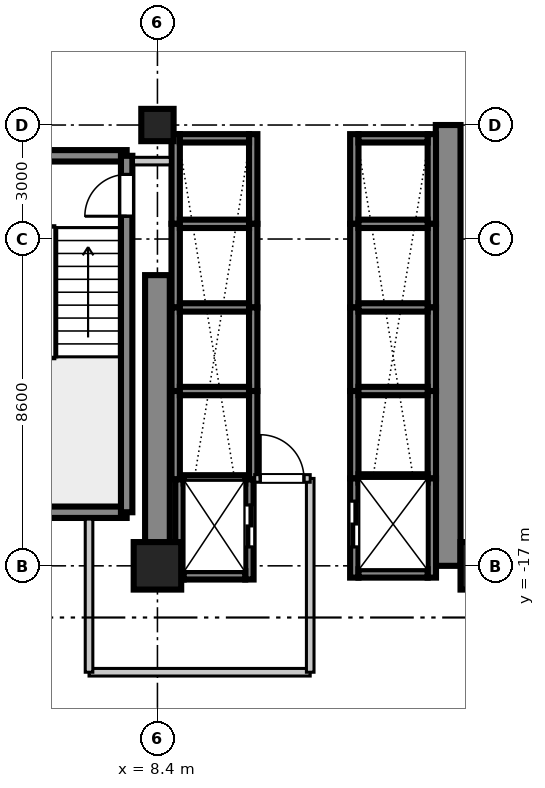
"""IFC4 building model, lengths in metres.
Left out: names, types, materials, properties, quantities, classifications, styles, units other than length and angle.
Written with IfcOpenShell. Run it as: python <this file> out.ifc"""

import sys

from ifc_helpers import new_model, si_unit, direction, frame, frame_2d, origin, origin_2d, place, context, subcontext, project, spatial, rectangle, extrude, source, transform, mapped, element, fill, save


model = new_model("IFC4")
c1 = context("Model", 3, precision=1e-05, world=origin(), true_north=direction((0.0, 1.0)))
c2 = subcontext(c1, "Body", "Model", "MODEL_VIEW")
j1 = project(units=[si_unit("LENGTHUNIT", "METRE"), si_unit("PLANEANGLEUNIT", "RADIAN")], contexts=[c1])
p1 = place(None, origin())
s1 = spatial("IfcSite", under=j1, at=p1, CompositionType="ELEMENT")
p2 = place(p1, origin())
s2 = spatial("IfcBuilding", under=s1, at=p2, CompositionType="ELEMENT")
p3 = place(p2, frame((0.0, 0.0, 91.95)))
s3 = spatial("IfcBuildingStorey", under=s2, at=p3, CompositionType="ELEMENT", Elevation=91.95)
m1 = source(origin(), c2, "Body", "SweptSolid", [
    extrude(rectangle(XDim=1.25, YDim=1.25, at=origin_2d()), origin(), (0.0, 0.0, 1.0), 3.605),
])
p4 = place(p3, frame((8.4, -17.0, 0.0), z_axis=(0.0, 0.0, 1.0), x_axis=(1.0, 0.0, 0.0)))
e1 = element("IfcColumn", 1, at=p4, inside=s3, PredefinedType="COLUMN", context=c2, shape_type="MappedRepresentation", body=[
    mapped(m1, transform((0.0, 0.0, 0.0), scale=1.0)),
])
m2 = source(origin(), c2, "Body", "SweptSolid", [
    extrude(rectangle(XDim=0.85, YDim=0.85, at=origin_2d()), origin(), (0.0, 0.0, 1.0), 3.605),
])
p5 = place(p3, frame((8.4, -5.4, 0.0), z_axis=(0.0, 0.0, 1.0), x_axis=(1.0, 0.0, 0.0)))
e2 = element("IfcColumn", 2, at=p5, inside=s3, PredefinedType="PILASTER", context=c2, shape_type="MappedRepresentation", body=[
    mapped(m2, transform((0.0, 0.0, 0.0), scale=1.0)),
])
p6 = place(p3, frame((17.0, -17.0, 0.0), z_axis=(0.0, 0.0, 1.0), x_axis=(1.0, 0.0, 0.0)))
e3 = element("IfcColumn", 3, at=p6, inside=s3, PredefinedType="COLUMN", context=c2, shape_type="MappedRepresentation", body=[
    mapped(m1, transform((0.0, 0.0, 0.0), scale=1.0)),
])
m3 = source(origin(), c2, "Body", "SweptSolid", [
    extrude(rectangle(XDim=7.65, YDim=0.65, at=frame_2d((3.825, 0.0))), origin(), (0.0, 0.0, 1.0), 3.38),
])
p7 = place(p3, frame((8.4, -17.0, 0.0), z_axis=(0.0, 0.0, 1.0), x_axis=(0.0, 1.0, 0.0)))
e4 = element("IfcWall", 4, at=p7, inside=s3, PredefinedType="SHEAR", context=c2, shape_type="MappedRepresentation", body=[
    mapped(m3, transform((0.0, 0.0, 0.0), scale=1.0)),
])
m4 = source(origin(), c2, "Body", "SweptSolid", [
    extrude(rectangle(XDim=11.6, YDim=0.65, at=frame_2d((5.8, 0.0))), origin(), (0.0, 0.0, 1.0), 3.38),
])
p8 = place(p3, frame((16.05, -17.0, 0.0), z_axis=(0.0, 0.0, 1.0), x_axis=(0.0, 1.0, 0.0)))
e5 = element("IfcWall", 5, at=p8, inside=s3, PredefinedType="SHEAR", context=c2, shape_type="MappedRepresentation", body=[
    mapped(m4, transform((0.0, 0.0, 0.0), scale=1.0)),
])
m5 = source(origin(), c2, "Body", "SweptSolid", [
    extrude(rectangle(XDim=3.98, YDim=0.3, at=frame_2d((1.99, 0.0))), origin(), (0.0, 0.0, 1.0), 3.38),
])
for number, where, z_axis, x_axis in (
    (6, (3.61, -15.59, 0.0), (0.0, 0.0, 1.0), (1.0, 0.0, 0.0)),
    (7, (3.61, -6.21, 0.0), (0.0, 0.0, 1.0), (1.0, 0.0, 0.0)),
):
    element("IfcWall", number, at=place(p3, frame(where, z_axis=z_axis, x_axis=x_axis)), inside=s3, PredefinedType="SHEAR", context=c2, shape_type="MappedRepresentation", body=[
        mapped(m5, transform((0.0, 0.0, 0.0), scale=1.0)),
    ])
m6 = source(origin(), c2, "Body", "SweptSolid", [
    extrude(rectangle(XDim=9.38, YDim=0.3, at=frame_2d((4.69, 0.0))), origin(), (0.0, 0.0, 1.0), 3.38),
])
p9 = place(p3, frame((7.59, -15.59, 0.0), z_axis=(0.0, 0.0, 1.0), x_axis=(0.0, 1.0, 0.0)))
e8 = element("IfcWall", 8, at=p9, inside=s3, PredefinedType="SHEAR", context=c2, shape_type="MappedRepresentation", body=[
    mapped(m6, transform((0.0, 0.0, 0.0), scale=1.0)),
])
p10 = place(p9, frame((7.79, 0.0, 0.0)))
e9 = element("IfcOpeningElement", 9, at=p10, cuts=e8, PredefinedType="OPENING", context=c2, shape_type="SweptSolid", body=[
    extrude(rectangle(XDim=1.1, YDim=2.15, at=frame_2d((0.55, 1.075))), frame((0.0, 0.16, 0.0), z_axis=(0.0, -1.0, 0.0), x_axis=(1.0, 0.0, 0.0)), (0.0, 0.0, 1.0), 0.32),
])
m7 = source(origin(), c2, "Body", "SweptSolid", [
    extrude(rectangle(XDim=2.36, YDim=0.22, at=frame_2d((1.18, 0.0))), origin(), (0.0, 0.0, 1.0), 3.38),
])
for number, where, z_axis, x_axis in (
    (10, (13.58, -8.0, 0.0), (0.0, 0.0, 1.0), (0.0, 1.0, 0.0)),
    (11, (15.62, -8.0, 0.0), (0.0, 0.0, 1.0), (0.0, 1.0, 0.0)),
):
    element("IfcWall", number, at=place(p3, frame(where, z_axis=z_axis, x_axis=x_axis)), inside=s3, PredefinedType="SHEAR", context=c2, shape_type="MappedRepresentation", body=[
        mapped(m7, transform((0.0, 0.0, 0.0), scale=1.0)),
    ])
m8 = source(origin(), c2, "Body", "SweptSolid", [
    extrude(rectangle(XDim=1.82, YDim=0.22, at=frame_2d((0.91, 0.0))), origin(), (0.0, 0.0, 1.0), 3.38),
])
p11 = place(p3, frame((13.69, -5.75, 0.0), z_axis=(0.0, 0.0, 1.0), x_axis=(1.0, 0.0, 0.0)))
e12 = element("IfcWall", 12, at=p11, inside=s3, PredefinedType="SHEAR", context=c2, shape_type="MappedRepresentation", body=[
    mapped(m8, transform((0.0, 0.0, 0.0), scale=1.0)),
])
m9 = source(origin(), c2, "Body", "SweptSolid", [
    extrude(rectangle(XDim=2.2, YDim=0.22, at=frame_2d((1.1, 0.0))), origin(), (0.0, 0.0, 1.0), 3.38),
])
for number, where, z_axis, x_axis in (
    (13, (13.58, -10.2, 0.0), (0.0, 0.0, 1.0), (0.0, 1.0, 0.0)),
    (14, (15.62, -10.2, 0.0), (0.0, 0.0, 1.0), (0.0, 1.0, 0.0)),
):
    element("IfcWall", number, at=place(p3, frame(where, z_axis=z_axis, x_axis=x_axis)), inside=s3, PredefinedType="SHEAR", context=c2, shape_type="MappedRepresentation", body=[
        mapped(m9, transform((0.0, 0.0, 0.0), scale=1.0)),
    ])
m10 = source(origin(), c2, "Body", "SweptSolid", [
    extrude(rectangle(XDim=1.82, YDim=0.22, at=frame_2d((0.91, 0.0))), origin(), (0.0, 0.0, 1.0), 3.65),
])
p12 = place(p3, frame((13.69, -8.0, 0.0), z_axis=(0.0, 0.0, 1.0), x_axis=(1.0, 0.0, 0.0)))
e15 = element("IfcWall", 15, at=p12, inside=s3, PredefinedType="SHEAR", context=c2, shape_type="MappedRepresentation", body=[
    mapped(m10, transform((0.0, 0.0, 0.0), scale=1.0)),
])
for number, where, z_axis, x_axis in (
    (16, (13.58, -12.4, 0.0), (0.0, 0.0, 1.0), (0.0, 1.0, 0.0)),
    (17, (15.62, -12.4, 0.0), (0.0, 0.0, 1.0), (0.0, 1.0, 0.0)),
):
    element("IfcWall", number, at=place(p3, frame(where, z_axis=z_axis, x_axis=x_axis)), inside=s3, PredefinedType="SHEAR", context=c2, shape_type="MappedRepresentation", body=[
        mapped(m9, transform((0.0, 0.0, 0.0), scale=1.0)),
    ])
p13 = place(p3, frame((13.69, -10.2, 0.0), z_axis=(0.0, 0.0, 1.0), x_axis=(1.0, 0.0, 0.0)))
e18 = element("IfcWall", 18, at=p13, inside=s3, PredefinedType="SHEAR", context=c2, shape_type="MappedRepresentation", body=[
    mapped(m10, transform((0.0, 0.0, 0.0), scale=1.0)),
])
m11 = source(origin(), c2, "Body", "SweptSolid", [
    extrude(rectangle(XDim=2.3, YDim=0.22, at=frame_2d((1.15, 0.0))), origin(), (0.0, 0.0, 1.0), 3.38),
])
for number, where, z_axis, x_axis in (
    (19, (13.58, -14.7, 0.0), (0.0, 0.0, 1.0), (0.0, 1.0, 0.0)),
    (20, (15.62, -14.7, 0.0), (0.0, 0.0, 1.0), (0.0, 1.0, 0.0)),
):
    element("IfcWall", number, at=place(p3, frame(where, z_axis=z_axis, x_axis=x_axis)), inside=s3, PredefinedType="SHEAR", context=c2, shape_type="MappedRepresentation", body=[
        mapped(m11, transform((0.0, 0.0, 0.0), scale=1.0)),
    ])
p14 = place(p3, frame((13.69, -12.4, 0.0), z_axis=(0.0, 0.0, 1.0), x_axis=(1.0, 0.0, 0.0)))
e21 = element("IfcWall", 21, at=p14, inside=s3, PredefinedType="SHEAR", context=c2, shape_type="MappedRepresentation", body=[
    mapped(m10, transform((0.0, 0.0, 0.0), scale=1.0)),
])
for number, where, z_axis, x_axis in (
    (22, (8.88, -8.0, 0.0), (0.0, 0.0, 1.0), (0.0, 1.0, 0.0)),
    (23, (10.92, -8.0, 0.0), (0.0, 0.0, 1.0), (0.0, 1.0, 0.0)),
):
    element("IfcWall", number, at=place(p3, frame(where, z_axis=z_axis, x_axis=x_axis)), inside=s3, PredefinedType="SHEAR", context=c2, shape_type="MappedRepresentation", body=[
        mapped(m7, transform((0.0, 0.0, 0.0), scale=1.0)),
    ])
p15 = place(p3, frame((8.99, -5.75, 0.0), z_axis=(0.0, 0.0, 1.0), x_axis=(1.0, 0.0, 0.0)))
e24 = element("IfcWall", 24, at=p15, inside=s3, PredefinedType="SHEAR", context=c2, shape_type="MappedRepresentation", body=[
    mapped(m8, transform((0.0, 0.0, 0.0), scale=1.0)),
])
for number, where, z_axis, x_axis in (
    (25, (8.88, -10.2, 0.0), (0.0, 0.0, 1.0), (0.0, 1.0, 0.0)),
    (26, (10.92, -10.2, 0.0), (0.0, 0.0, 1.0), (0.0, 1.0, 0.0)),
):
    element("IfcWall", number, at=place(p3, frame(where, z_axis=z_axis, x_axis=x_axis)), inside=s3, PredefinedType="SHEAR", context=c2, shape_type="MappedRepresentation", body=[
        mapped(m9, transform((0.0, 0.0, 0.0), scale=1.0)),
    ])
p16 = place(p3, frame((8.99, -8.0, 0.0), z_axis=(0.0, 0.0, 1.0), x_axis=(1.0, 0.0, 0.0)))
e27 = element("IfcWall", 27, at=p16, inside=s3, PredefinedType="SHEAR", context=c2, shape_type="MappedRepresentation", body=[
    mapped(m10, transform((0.0, 0.0, 0.0), scale=1.0)),
])
for number, where, z_axis, x_axis in (
    (28, (8.88, -12.4, 0.0), (0.0, 0.0, 1.0), (0.0, 1.0, 0.0)),
    (29, (10.92, -12.4, 0.0), (0.0, 0.0, 1.0), (0.0, 1.0, 0.0)),
):
    element("IfcWall", number, at=place(p3, frame(where, z_axis=z_axis, x_axis=x_axis)), inside=s3, PredefinedType="SHEAR", context=c2, shape_type="MappedRepresentation", body=[
        mapped(m9, transform((0.0, 0.0, 0.0), scale=1.0)),
    ])
p17 = place(p3, frame((8.99, -10.2, 0.0), z_axis=(0.0, 0.0, 1.0), x_axis=(1.0, 0.0, 0.0)))
e30 = element("IfcWall", 30, at=p17, inside=s3, PredefinedType="SHEAR", context=c2, shape_type="MappedRepresentation", body=[
    mapped(m10, transform((0.0, 0.0, 0.0), scale=1.0)),
])
m12 = source(origin(), c2, "Body", "SweptSolid", [
    extrude(rectangle(XDim=2.325, YDim=0.22, at=frame_2d((1.163, 0.0))), origin(), (0.0, 0.0, 1.0), 3.38),
])
for number, where, z_axis, x_axis in (
    (31, (8.88, -14.725, 0.0), (0.0, 0.0, 1.0), (0.0, 1.0, 0.0)),
    (32, (10.92, -14.725, 0.0), (0.0, 0.0, 1.0), (0.0, 1.0, 0.0)),
):
    element("IfcWall", number, at=place(p3, frame(where, z_axis=z_axis, x_axis=x_axis)), inside=s3, PredefinedType="SHEAR", context=c2, shape_type="MappedRepresentation", body=[
        mapped(m12, transform((0.0, 0.0, 0.0), scale=1.0)),
    ])
p18 = place(p3, frame((8.99, -12.4, 0.0), z_axis=(0.0, 0.0, 1.0), x_axis=(1.0, 0.0, 0.0)))
e33 = element("IfcWall", 33, at=p18, inside=s3, PredefinedType="SHEAR", context=c2, shape_type="MappedRepresentation", body=[
    mapped(m10, transform((0.0, 0.0, 0.0), scale=1.0)),
])
m13 = source(origin(), c2, "Body", "SweptSolid", [
    extrude(rectangle(XDim=2.635, YDim=0.22, at=frame_2d((1.317, 0.0))), origin(), (0.0, 0.0, 1.0), 3.38),
])
p19 = place(p3, frame((8.98, -17.36, 0.0), z_axis=(0.0, 0.0, 1.0), x_axis=(0.0, 1.0, 0.0)))
e34 = element("IfcWall", 34, at=p19, inside=s3, PredefinedType="SHEAR", context=c2, shape_type="MappedRepresentation", body=[
    mapped(m13, transform((0.0, 0.0, 0.0), scale=1.0)),
])
p20 = place(p3, frame((10.82, -17.36, 0.0), z_axis=(0.0, 0.0, 1.0), x_axis=(0.0, 1.0, 0.0)))
e35 = element("IfcWall", 35, at=p20, inside=s3, PredefinedType="SHEAR", context=c2, shape_type="MappedRepresentation", body=[
    mapped(m13, transform((0.0, 0.0, 0.0), scale=1.0)),
])
p21 = place(p20, frame((0.86, 0.0, 0.0)))
e36 = element("IfcOpeningElement", 36, at=p21, cuts=e35, PredefinedType="OPENING", context=c2, shape_type="SweptSolid", body=[
    extrude(rectangle(XDim=1.1, YDim=2.2, at=frame_2d((0.55, 1.1))), frame((0.0, 0.12, 0.0), z_axis=(0.0, -1.0, 0.0), x_axis=(1.0, 0.0, 0.0)), (0.0, 0.0, 1.0), 0.24),
])
m14 = source(origin(), c2, "Body", "SweptSolid", [
    extrude(rectangle(XDim=1.62, YDim=0.22, at=frame_2d((0.81, 0.0))), origin(), (0.0, 0.0, 1.0), 3.38),
])
p22 = place(p3, frame((9.09, -17.25, 0.0), z_axis=(0.0, 0.0, 1.0), x_axis=(1.0, 0.0, 0.0)))
e37 = element("IfcWall", 37, at=p22, inside=s3, PredefinedType="SHEAR", context=c2, shape_type="MappedRepresentation", body=[
    mapped(m14, transform((0.0, 0.0, 0.0), scale=1.0)),
])
m15 = source(origin(), c2, "Body", "SweptSolid", [
    extrude(rectangle(XDim=1.62, YDim=0.22, at=frame_2d((0.81, 0.0))), origin(), (0.0, 0.0, 1.0), 3.65),
])
p23 = place(p3, frame((9.09, -14.725, 0.0), z_axis=(0.0, 0.0, 1.0), x_axis=(1.0, 0.0, 0.0)))
e38 = element("IfcWall", 38, at=p23, inside=s3, PredefinedType="SHEAR", context=c2, shape_type="MappedRepresentation", body=[
    mapped(m15, transform((0.0, 0.0, 0.0), scale=1.0)),
])
m16 = source(origin(), c2, "Body", "SweptSolid", [
    extrude(rectangle(XDim=2.61, YDim=0.22, at=frame_2d((1.305, 0.0))), origin(), (0.0, 0.0, 1.0), 3.38),
])
p24 = place(p3, frame((13.58, -17.31, 0.0), z_axis=(0.0, 0.0, 1.0), x_axis=(0.0, 1.0, 0.0)))
e39 = element("IfcWall", 39, at=p24, inside=s3, PredefinedType="SHEAR", context=c2, shape_type="MappedRepresentation", body=[
    mapped(m16, transform((0.0, 0.0, 0.0), scale=1.0)),
])
p25 = place(p24, frame((0.81, 0.0, 0.0)))
e40 = element("IfcOpeningElement", 40, at=p25, cuts=e39, PredefinedType="OPENING", context=c2, shape_type="SweptSolid", body=[
    extrude(rectangle(XDim=1.2, YDim=2.2, at=frame_2d((0.6, 1.1))), frame((0.0, 0.12, 0.0), z_axis=(0.0, -1.0, 0.0), x_axis=(1.0, 0.0, 0.0)), (0.0, 0.0, 1.0), 0.24),
])
p26 = place(p3, frame((15.62, -17.31, 0.0), z_axis=(0.0, 0.0, 1.0), x_axis=(0.0, 1.0, 0.0)))
e41 = element("IfcWall", 41, at=p26, inside=s3, PredefinedType="SHEAR", context=c2, shape_type="MappedRepresentation", body=[
    mapped(m16, transform((0.0, 0.0, 0.0), scale=1.0)),
])
p27 = place(p3, frame((13.69, -17.2, 0.0), z_axis=(0.0, 0.0, 1.0), x_axis=(1.0, 0.0, 0.0)))
e42 = element("IfcWall", 42, at=p27, inside=s3, PredefinedType="SHEAR", context=c2, shape_type="MappedRepresentation", body=[
    mapped(m8, transform((0.0, 0.0, 0.0), scale=1.0)),
])
p28 = place(p3, frame((13.69, -14.7, 0.0), z_axis=(0.0, 0.0, 1.0), x_axis=(1.0, 0.0, 0.0)))
e43 = element("IfcWall", 43, at=p28, inside=s3, PredefinedType="SHEAR", context=c2, shape_type="MappedRepresentation", body=[
    mapped(m10, transform((0.0, 0.0, 0.0), scale=1.0)),
])
m17 = source(origin(), c2, "Body", "SweptSolid", [
    extrude(rectangle(XDim=5.82, YDim=0.2, at=frame_2d((2.91, 0.0))), origin(), (0.0, 0.0, 1.0), 2.72),
])
p29 = place(p3, frame((6.6, -19.8, 0.0), z_axis=(0.0, 0.0, 1.0), x_axis=(1.0, 0.0, 0.0)))
e44 = element("IfcWall", 44, at=p29, inside=s3, PredefinedType="PARTITIONING", context=c2, shape_type="MappedRepresentation", body=[
    mapped(m17, transform((0.0, 0.0, 0.0), scale=1.0)),
])
m18 = source(origin(), c2, "Body", "SweptSolid", [
    extrude(rectangle(XDim=4.03, YDim=0.2, at=frame_2d((2.015, 0.0))), origin(), (0.0, 0.0, 1.0), 2.72),
])
p30 = place(p3, frame((6.6, -19.8, 0.0), z_axis=(0.0, 0.0, 1.0), x_axis=(0.0, 1.0, 0.0)))
e45 = element("IfcWall", 45, at=p30, inside=s3, PredefinedType="PARTITIONING", context=c2, shape_type="MappedRepresentation", body=[
    mapped(m18, transform((0.0, 0.0, 0.0), scale=1.0)),
])
m19 = source(origin(), c2, "Body", "SweptSolid", [
    extrude(rectangle(XDim=5.1, YDim=0.2, at=frame_2d((2.55, 0.0))), origin(), (0.0, 0.0, 1.0), 2.72),
])
p31 = place(p3, frame((12.42, -19.8, 0.0), z_axis=(0.0, 0.0, 1.0), x_axis=(0.0, 1.0, 0.0)))
e46 = element("IfcWall", 46, at=p31, inside=s3, PredefinedType="PARTITIONING", context=c2, shape_type="MappedRepresentation", body=[
    mapped(m19, transform((0.0, 0.0, 0.0), scale=1.0)),
])
m20 = source(origin(), c2, "Body", "SweptSolid", [
    extrude(rectangle(XDim=1.46, YDim=0.2, at=frame_2d((0.73, 0.0))), origin(), (0.0, 0.0, 1.0), 2.72),
])
p32 = place(p3, frame((10.96, -14.7, 0.0), z_axis=(0.0, 0.0, 1.0), x_axis=(1.0, 0.0, 0.0)))
e47 = element("IfcWall", 47, at=p32, inside=s3, PredefinedType="PARTITIONING", context=c2, shape_type="MappedRepresentation", body=[
    mapped(m20, transform((0.0, 0.0, 0.0), scale=1.0)),
])
p33 = place(p32, frame((0.145, 0.0, 0.0)))
e48 = element("IfcOpeningElement", 48, at=p33, cuts=e47, PredefinedType="OPENING", context=c2, shape_type="SweptSolid", body=[
    extrude(rectangle(XDim=1.15, YDim=2.15, at=frame_2d((0.575, 1.075))), frame((0.0, 0.11, 0.0), z_axis=(0.0, -1.0, 0.0), x_axis=(1.0, 0.0, 0.0)), (0.0, 0.0, 1.0), 0.22),
])
m21 = source(origin(), c2, "Body", "SweptSolid", [
    extrude(rectangle(XDim=0.97, YDim=0.2, at=frame_2d((0.485, 0.0))), origin(), (0.0, 0.0, 1.0), 2.72),
])
p34 = place(p3, frame((7.77, -6.35, 0.0), z_axis=(0.0, 0.0, 1.0), x_axis=(1.0, 0.0, 0.0)))
e49 = element("IfcWall", 49, at=p34, inside=s3, PredefinedType="PARTITIONING", context=c2, shape_type="MappedRepresentation", body=[
    mapped(m21, transform((0.0, 0.0, 0.0), scale=1.0)),
])
m22 = source(origin(), c2, "Body", "SweptSolid", [
    extrude(rectangle(XDim=1.1, YDim=2.15, at=frame_2d((0.55, 1.075))), frame((0.0, 0.025, 0.0), z_axis=(0.0, -1.0, 0.0), x_axis=(1.0, 0.0, 0.0)), (0.0, 0.0, 1.0), 0.05),
])
p35 = place(p10, origin())
e50 = element("IfcDoor", 50, at=p35, inside=s3, OperationType="SINGLE_SWING_LEFT", PredefinedType="DOOR", context=c2, shape_type="MappedRepresentation", body=[
    mapped(m22, transform((0.0, 0.0, 0.0), scale=1.0)),
])
fill(e9, e50)
m23 = source(origin(), c2, "Body", "SweptSolid", [
    extrude(rectangle(XDim=1.1, YDim=2.2, at=frame_2d((0.55, 1.1))), frame((0.0, 0.025, 0.0), z_axis=(0.0, -1.0, 0.0), x_axis=(1.0, 0.0, 0.0)), (0.0, 0.0, 1.0), 0.05),
])
p36 = place(p21, frame((1.1, 0.0, 0.0), z_axis=(0.0, 0.0, 1.0), x_axis=(-1.0, 0.0, 0.0)))
e51 = element("IfcDoor", 51, at=p36, inside=s3, OperationType="DOUBLE_DOOR_SLIDING", PredefinedType="DOOR", context=c2, shape_type="MappedRepresentation", body=[
    mapped(m23, transform((0.0, 0.0, 0.0), scale=1.0)),
])
fill(e36, e51)
m24 = source(origin(), c2, "Body", "SweptSolid", [
    extrude(rectangle(XDim=1.2, YDim=2.2, at=frame_2d((0.6, 1.1))), frame((0.0, 0.025, 0.0), z_axis=(0.0, -1.0, 0.0), x_axis=(1.0, 0.0, 0.0)), (0.0, 0.0, 1.0), 0.05),
])
p37 = place(p25, origin())
e52 = element("IfcDoor", 52, at=p37, inside=s3, OperationType="DOUBLE_DOOR_SLIDING", PredefinedType="DOOR", context=c2, shape_type="MappedRepresentation", body=[
    mapped(m24, transform((0.0, 0.0, 0.0), scale=1.0)),
])
fill(e40, e52)
m25 = source(origin(), c2, "Body", "SweptSolid", [
    extrude(rectangle(XDim=1.15, YDim=2.15, at=frame_2d((0.575, 1.075))), frame((0.0, 0.025, 0.0), z_axis=(0.0, -1.0, 0.0), x_axis=(1.0, 0.0, 0.0)), (0.0, 0.0, 1.0), 0.05),
])
p38 = place(p33, origin())
e53 = element("IfcDoor", 53, at=p38, inside=s3, OperationType="SINGLE_SWING_LEFT", PredefinedType="DOOR", context=c2, shape_type="MappedRepresentation", body=[
    mapped(m25, transform((0.0, 0.0, 0.0), scale=1.0)),
])
fill(e48, e53)
save(model, sys.argv[1])
